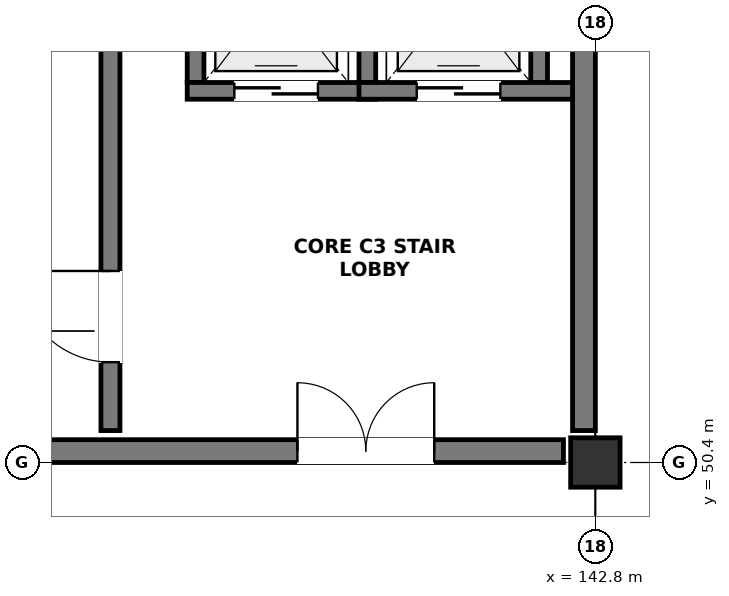
"""IFC4 building model, lengths in metres.
Left out: names, types, materials, properties, quantities, classifications, styles, units other than length and angle.
Written with IfcOpenShell. Run it as: python <this file> out.ifc"""

import sys

from ifc_helpers import new_model, si_unit, direction, frame, frame_2d, origin, origin_2d, place, context, subcontext, project, spatial, rectangle, extrude, element, fill, save


model = new_model("IFC4")
c1 = context("Model", 3, precision=1e-05, world=origin(), true_north=direction((0.0, 1.0)))
c2 = subcontext(c1, "Body", "Model", "MODEL_VIEW")
j1 = project(units=[si_unit("LENGTHUNIT", "METRE"), si_unit("PLANEANGLEUNIT", "RADIAN")], contexts=[c1])
p1 = place(None, origin())
s1 = spatial("IfcSite", under=j1, at=p1, CompositionType="ELEMENT")
p2 = place(p1, origin())
s2 = spatial("IfcBuilding", under=s1, at=p2, CompositionType="ELEMENT")
p3 = place(p2, frame((0.0, 0.0, 9.9)))
s3 = spatial("IfcBuildingStorey", under=s2, at=p3, CompositionType="ELEMENT", Elevation=9.9)
p4 = place(p3, frame((142.8, 50.4, 0.0), z_axis=(0.0, 0.0, 1.0), x_axis=(1.0, 0.0, 0.0)))
e1 = element("IfcColumn", 1, at=p4, inside=s3, PredefinedType="COLUMN", context=c2, shape_type="SweptSolid", body=[
    extrude(rectangle(XDim=0.65, YDim=0.65, at=origin_2d()), origin(), (0.0, 0.0, 1.0), 4.5),
])
p5 = place(p3, frame((126.45, 50.55, 0.0), z_axis=(0.0, 0.0, 1.0), x_axis=(1.0, 0.0, 0.0)))
e2 = element("IfcWall", 2, at=p5, inside=s3, PredefinedType="SHEAR", context=c2, shape_type="SweptSolid", body=[
    extrude(rectangle(XDim=15.93, YDim=0.3, at=frame_2d((7.965, 0.0))), origin(), (0.0, 0.0, 1.0), 4.22),
])
p6 = place(p5, frame((12.43, 0.0, 0.0)))
e3 = element("IfcOpeningElement", 3, at=p6, cuts=e2, PredefinedType="OPENING", context=c2, shape_type="SweptSolid", body=[
    extrude(rectangle(XDim=1.8, YDim=2.2, at=frame_2d((0.9, 1.1))), frame((0.0, 0.162, 0.0), z_axis=(0.0, -1.0, 0.0), x_axis=(1.0, 0.0, 0.0)), (0.0, 0.0, 1.0), 0.324),
])
p7 = place(p3, frame((142.65, 50.82, 0.0), z_axis=(0.0, 0.0, 1.0), x_axis=(0.0, 1.0, 0.0)))
e4 = element("IfcWall", 4, at=p7, inside=s3, PredefinedType="SHEAR", context=c2, shape_type="SweptSolid", body=[
    extrude(rectangle(XDim=7.56, YDim=0.3, at=frame_2d((3.78, 0.0))), origin(), (0.0, 0.0, 1.0), 4.22),
])
p8 = place(p3, frame((136.42, 50.82, 0.0), z_axis=(0.0, 0.0, 1.0), x_axis=(0.0, 1.0, 0.0)))
e5 = element("IfcWall", 5, at=p8, inside=s3, PredefinedType="SHEAR", context=c2, shape_type="SweptSolid", body=[
    extrude(rectangle(XDim=7.56, YDim=0.25, at=frame_2d((3.78, 0.0))), origin(), (0.0, 0.0, 1.0), 4.22),
])
p9 = place(p8, frame((0.9, 0.0, 0.0)))
e6 = element("IfcOpeningElement", 6, at=p9, cuts=e5, PredefinedType="OPENING", context=c2, shape_type="SweptSolid", body=[
    extrude(rectangle(XDim=1.2, YDim=2.2, at=frame_2d((0.6, 1.1))), frame((0.0, 0.137, 0.0), z_axis=(0.0, -1.0, 0.0), x_axis=(1.0, 0.0, 0.0)), (0.0, 0.0, 1.0), 0.274),
])
p10 = place(p3, frame((137.54, 55.4, 0.0), z_axis=(0.0, 0.0, 1.0), x_axis=(0.0, 1.0, 0.0)))
e7 = element("IfcWall", 7, at=p10, inside=s3, PredefinedType="SOLIDWALL", context=c2, shape_type="SweptSolid", body=[
    extrude(rectangle(XDim=2.4, YDim=0.22, at=frame_2d((1.2, 0.0))), origin(), (0.0, 0.0, 1.0), 4.22),
])
p11 = place(p3, frame((137.43, 55.29, 0.0), z_axis=(0.0, 0.0, 1.0), x_axis=(1.0, 0.0, 0.0)))
e8 = element("IfcWall", 8, at=p11, inside=s3, PredefinedType="SOLIDWALL", context=c2, shape_type="SweptSolid", body=[
    extrude(rectangle(XDim=2.48, YDim=0.22, at=frame_2d((1.24, 0.0))), origin(), (0.0, 0.0, 1.0), 4.22),
])
p12 = place(p11, frame((0.62, 0.0, 0.0)))
e9 = element("IfcOpeningElement", 9, at=p12, cuts=e8, PredefinedType="OPENING", context=c2, shape_type="SweptSolid", body=[
    extrude(rectangle(XDim=1.1, YDim=2.15, at=frame_2d((0.55, 1.075))), frame((0.0, 0.122, 0.0), z_axis=(0.0, -1.0, 0.0), x_axis=(1.0, 0.0, 0.0)), (0.0, 0.0, 1.0), 0.244),
])
for number, where, z_axis, x_axis in (
    (10, (139.8, 55.4, 0.0), (0.0, 0.0, 1.0), (0.0, 1.0, 0.0)),
    (11, (142.06, 55.4, 0.0), (0.0, 0.0, 1.0), (0.0, 1.0, 0.0)),
):
    element("IfcWall", number, at=place(p3, frame(where, z_axis=z_axis, x_axis=x_axis)), inside=s3, PredefinedType="SOLIDWALL", context=c2, shape_type="SweptSolid", body=[
        extrude(rectangle(XDim=2.4, YDim=0.22, at=frame_2d((1.2, 0.0))), origin(), (0.0, 0.0, 1.0), 4.22),
    ])
p13 = place(p3, frame((139.69, 55.29, 0.0), z_axis=(0.0, 0.0, 1.0), x_axis=(1.0, 0.0, 0.0)))
e12 = element("IfcWall", 12, at=p13, inside=s3, PredefinedType="SOLIDWALL", context=c2, shape_type="SweptSolid", body=[
    extrude(rectangle(XDim=2.81, YDim=0.22, at=frame_2d((1.405, 0.0))), origin(), (0.0, 0.0, 1.0), 4.22),
])
p14 = place(p13, frame((0.76, 0.0, 0.0)))
e13 = element("IfcOpeningElement", 13, at=p14, cuts=e12, PredefinedType="OPENING", context=c2, shape_type="SweptSolid", body=[
    extrude(rectangle(XDim=1.1, YDim=2.15, at=frame_2d((0.55, 1.075))), frame((0.0, 0.122, 0.0), z_axis=(0.0, -1.0, 0.0), x_axis=(1.0, 0.0, 0.0)), (0.0, 0.0, 1.0), 0.244),
])
p15 = place(p6, origin())
e14 = element("IfcDoor", 14, at=p15, inside=s3, OperationType="DOUBLE_DOOR_SINGLE_SWING", PredefinedType="DOOR", context=c2, shape_type="SweptSolid", body=[
    extrude(rectangle(XDim=1.8, YDim=2.2, at=frame_2d((0.9, 1.1))), frame((0.0, 0.025, 0.0), z_axis=(0.0, -1.0, 0.0), x_axis=(1.0, 0.0, 0.0)), (0.0, 0.0, 1.0), 0.05),
])
fill(e3, e14)
p16 = place(p9, origin())
e15 = element("IfcDoor", 15, at=p16, inside=s3, OperationType="SINGLE_SWING_RIGHT", PredefinedType="DOOR", context=c2, shape_type="SweptSolid", body=[
    extrude(rectangle(XDim=1.2, YDim=2.2, at=frame_2d((0.6, 1.1))), frame((0.0, 0.025, 0.0), z_axis=(0.0, -1.0, 0.0), x_axis=(1.0, 0.0, 0.0)), (0.0, 0.0, 1.0), 0.05),
])
fill(e6, e15)
p17 = place(p12, origin())
e16 = element("IfcDoor", 16, at=p17, inside=s3, OperationType="DOUBLE_DOOR_SLIDING", PredefinedType="DOOR", context=c2, shape_type="SweptSolid", body=[
    extrude(rectangle(XDim=1.1, YDim=2.15, at=frame_2d((0.55, 1.075))), frame((0.0, 0.025, 0.0), z_axis=(0.0, -1.0, 0.0), x_axis=(1.0, 0.0, 0.0)), (0.0, 0.0, 1.0), 0.05),
])
fill(e9, e16)
p18 = place(p14, origin())
e17 = element("IfcDoor", 17, at=p18, inside=s3, OperationType="DOUBLE_DOOR_SLIDING", PredefinedType="DOOR", context=c2, shape_type="SweptSolid", body=[
    extrude(rectangle(XDim=1.1, YDim=2.15, at=frame_2d((0.55, 1.075))), frame((0.0, 0.025, 0.0), z_axis=(0.0, -1.0, 0.0), x_axis=(1.0, 0.0, 0.0)), (0.0, 0.0, 1.0), 0.05),
])
fill(e13, e17)
save(model, sys.argv[1])
